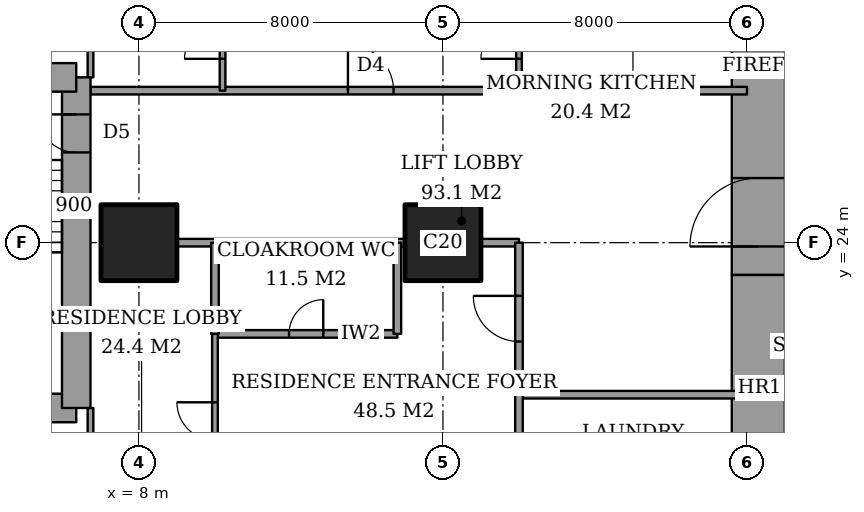
"""IFC4 building model, lengths in metres.
Left out: names, types, materials, properties, quantities, classifications, styles, units other than length and angle.
Written with IfcOpenShell. Run it as: python <this file> out.ifc"""

import sys

from ifc_helpers import new_model, si_unit, direction, frame, frame_2d, origin, origin_2d, place, context, subcontext, project, spatial, rectangle, extrude, element, fill, save


model = new_model("IFC4")
c1 = context("Model", 3, precision=1e-05, world=origin(), true_north=direction((0.0, 1.0)))
c2 = subcontext(c1, "Body", "Model", "MODEL_VIEW")
j1 = project(units=[si_unit("LENGTHUNIT", "METRE"), si_unit("PLANEANGLEUNIT", "RADIAN")], contexts=[c1])
p1 = place(None, origin())
s1 = spatial("IfcSite", under=j1, at=p1, CompositionType="ELEMENT")
p2 = place(p1, origin())
s2 = spatial("IfcBuilding", under=s1, at=p2, CompositionType="ELEMENT")
p3 = place(p2, frame((0.0, 0.0, 121.4)))
s3 = spatial("IfcBuildingStorey", under=s2, at=p3, CompositionType="ELEMENT", Elevation=121.4)
for number, where, z_axis, x_axis in (
    (1, (8.0, 24.0, 0.0), (0.0, 0.0, 1.0), (1.0, 0.0, 0.0)),
    (2, (16.0, 24.0, 0.0), (0.0, 0.0, 1.0), (1.0, 0.0, 0.0)),
):
    element("IfcColumn", number, at=place(p3, frame(where, z_axis=z_axis, x_axis=x_axis)), inside=s3, PredefinedType="COLUMN", context=c2, shape_type="SweptSolid", body=[
        extrude(rectangle(XDim=2.0, YDim=2.0, at=origin_2d()), origin(), (0.0, 0.0, 1.0), 3.6),
    ])
p4 = place(p3, frame((24.3, 13.0, 0.0), z_axis=(0.0, 0.0, 1.0), x_axis=(0.0, 1.0, 0.0)))
e3 = element("IfcWall", 3, at=p4, inside=s3, PredefinedType="SHEAR", context=c2, shape_type="SweptSolid", body=[
    extrude(rectangle(XDim=10.15, YDim=1.4, at=frame_2d((5.075, 0.0))), origin(), (0.0, 0.0, 1.0), 3.6),
])
p5 = place(p3, frame((24.3, 23.15, 0.0), z_axis=(0.0, 0.0, 1.0), x_axis=(0.0, 1.0, 0.0)))
e4 = element("IfcWall", 4, at=p5, inside=s3, PredefinedType="SHEAR", context=c2, shape_type="SweptSolid", body=[
    extrude(rectangle(XDim=11.85, YDim=1.4, at=frame_2d((5.925, 0.0))), origin(), (0.0, 0.0, 1.0), 3.6),
])
p6 = place(p5, frame((0.75, 0.0, 0.0)))
e5 = element("IfcOpeningElement", 5, at=p6, cuts=e4, PredefinedType="OPENING", context=c2, shape_type="SweptSolid", body=[
    extrude(rectangle(XDim=1.8, YDim=2.4, at=frame_2d((0.9, 1.2))), frame((0.0, 0.71, 0.0), z_axis=(0.0, -1.0, 0.0), x_axis=(1.0, 0.0, 0.0)), (0.0, 0.0, 1.0), 1.42),
])
p7 = place(p3, frame((1.9, 19.65, 0.0), z_axis=(0.0, 0.0, 1.0), x_axis=(1.0, 0.0, 0.0)))
e6 = element("IfcWall", 6, at=p7, inside=s3, PredefinedType="SHEAR", context=c2, shape_type="SweptSolid", body=[
    extrude(rectangle(XDim=4.45, YDim=0.75, at=frame_2d((2.225, 0.0))), origin(), (0.0, 0.0, 1.0), 3.6),
])
p8 = place(p3, frame((6.35, 19.65, 0.0), z_axis=(0.0, 0.0, 1.0), x_axis=(0.0, 1.0, 0.0)))
e7 = element("IfcWall", 7, at=p8, inside=s3, PredefinedType="SHEAR", context=c2, shape_type="SweptSolid", body=[
    extrude(rectangle(XDim=8.7, YDim=0.75, at=frame_2d((4.35, 0.0))), origin(), (0.0, 0.0, 1.0), 3.6),
])
p9 = place(p8, frame((6.725, 0.0, 0.0)))
e8 = element("IfcOpeningElement", 8, at=p9, cuts=e7, PredefinedType="OPENING", context=c2, shape_type="SweptSolid", body=[
    extrude(rectangle(XDim=1.0, YDim=2.1, at=frame_2d((0.5, 1.05))), frame((0.0, 0.385, 0.0), z_axis=(0.0, -1.0, 0.0), x_axis=(1.0, 0.0, 0.0)), (0.0, 0.0, 1.0), 0.77),
])
p10 = place(p3, frame((6.35, 28.35, 0.0), z_axis=(0.0, 0.0, 1.0), x_axis=(-1.0, 0.0, 0.0)))
e9 = element("IfcWall", 9, at=p10, inside=s3, PredefinedType="SHEAR", context=c2, shape_type="SweptSolid", body=[
    extrude(rectangle(XDim=4.45, YDim=0.75, at=frame_2d((2.225, 0.0))), origin(), (0.0, 0.0, 1.0), 3.6),
])
p11 = place(p3, frame((18.0, 20.0, 0.0), z_axis=(0.0, 0.0, 1.0), x_axis=(1.0, 0.0, 0.0)))
e10 = element("IfcWall", 10, at=p11, inside=s3, PredefinedType="PARTITIONING", context=c2, shape_type="SweptSolid", body=[
    extrude(rectangle(XDim=6.0, YDim=0.2, at=frame_2d((3.0, 0.0))), origin(), (0.0, 0.0, 1.0), 3.35),
])
p12 = place(p3, frame((10.0, 21.6, 0.0), z_axis=(0.0, 0.0, 1.0), x_axis=(1.0, 0.0, 0.0)))
e11 = element("IfcWall", 11, at=p12, inside=s3, PredefinedType="PARTITIONING", context=c2, shape_type="SweptSolid", body=[
    extrude(rectangle(XDim=4.8, YDim=0.2, at=frame_2d((2.4, 0.0))), origin(), (0.0, 0.0, 1.0), 3.35),
])
p13 = place(p12, frame((1.95, 0.0, 0.0)))
e12 = element("IfcOpeningElement", 12, at=p13, cuts=e11, PredefinedType="OPENING", context=c2, shape_type="SweptSolid", body=[
    extrude(rectangle(XDim=0.9, YDim=2.1, at=frame_2d((0.45, 1.05))), frame((0.0, 0.11, 0.0), z_axis=(0.0, -1.0, 0.0), x_axis=(1.0, 0.0, 0.0)), (0.0, 0.0, 1.0), 0.22),
])
p14 = place(p3, frame((9.0, 24.0, 0.0), z_axis=(0.0, 0.0, 1.0), x_axis=(1.0, 0.0, 0.0)))
e13 = element("IfcWall", 13, at=p14, inside=s3, PredefinedType="PARTITIONING", context=c2, shape_type="SweptSolid", body=[
    extrude(rectangle(XDim=6.0, YDim=0.2, at=frame_2d((3.0, 0.0))), origin(), (0.0, 0.0, 1.0), 3.35),
])
p15 = place(p3, frame((17.0, 24.0, 0.0), z_axis=(0.0, 0.0, 1.0), x_axis=(1.0, 0.0, 0.0)))
e14 = element("IfcWall", 14, at=p15, inside=s3, PredefinedType="PARTITIONING", context=c2, shape_type="SweptSolid", body=[
    extrude(rectangle(XDim=1.0, YDim=0.2, at=frame_2d((0.5, 0.0))), origin(), (0.0, 0.0, 1.0), 3.35),
])
p16 = place(p3, frame((6.725, 28.0, 0.0), z_axis=(0.0, 0.0, 1.0), x_axis=(1.0, 0.0, 0.0)))
e15 = element("IfcWall", 15, at=p16, inside=s3, PredefinedType="PARTITIONING", context=c2, shape_type="SweptSolid", body=[
    extrude(rectangle(XDim=17.275, YDim=0.2, at=frame_2d((8.637, 0.0))), origin(), (0.0, 0.0, 1.0), 3.35),
])
p17 = place(p16, frame((6.775, 0.0, 0.0)))
e16 = element("IfcOpeningElement", 16, at=p17, cuts=e15, PredefinedType="OPENING", context=c2, shape_type="SweptSolid", body=[
    extrude(rectangle(XDim=1.2, YDim=2.4, at=frame_2d((0.6, 1.2))), frame((0.0, 0.11, 0.0), z_axis=(0.0, -1.0, 0.0), x_axis=(1.0, 0.0, 0.0)), (0.0, 0.0, 1.0), 0.22),
])
p18 = place(p3, frame((6.725, 17.2, 0.0), z_axis=(0.0, 0.0, 1.0), x_axis=(0.0, 1.0, 0.0)))
e17 = element("IfcWall", 17, at=p18, inside=s3, PredefinedType="PARTITIONING", context=c2, shape_type="SweptSolid", body=[
    extrude(rectangle(XDim=2.45, YDim=0.15, at=frame_2d((1.225, 0.0))), origin(), (0.0, 0.0, 1.0), 3.35),
])
p19 = place(p18, frame((0.538, 0.0, 0.0)))
e18 = element("IfcOpeningElement", 18, at=p19, cuts=e17, PredefinedType="OPENING", context=c2, shape_type="SweptSolid", body=[
    extrude(rectangle(XDim=1.0, YDim=2.1, at=frame_2d((0.5, 1.05))), frame((0.0, 0.085, 0.0), z_axis=(0.0, -1.0, 0.0), x_axis=(1.0, 0.0, 0.0)), (0.0, 0.0, 1.0), 0.17),
])
p20 = place(p3, frame((6.725, 28.35, 0.0), z_axis=(0.0, 0.0, 1.0), x_axis=(0.0, 1.0, 0.0)))
e19 = element("IfcWall", 19, at=p20, inside=s3, PredefinedType="PARTITIONING", context=c2, shape_type="SweptSolid", body=[
    extrude(rectangle(XDim=2.45, YDim=0.15, at=frame_2d((1.225, 0.0))), origin(), (0.0, 0.0, 1.0), 3.35),
])
p21 = place(p20, frame((0.962, 0.0, 0.0)))
e20 = element("IfcOpeningElement", 20, at=p21, cuts=e19, PredefinedType="OPENING", context=c2, shape_type="SweptSolid", body=[
    extrude(rectangle(XDim=0.9, YDim=2.1, at=frame_2d((0.45, 1.05))), frame((0.0, 0.085, 0.0), z_axis=(0.0, -1.0, 0.0), x_axis=(1.0, 0.0, 0.0)), (0.0, 0.0, 1.0), 0.17),
])
p22 = place(p3, frame((10.0, 21.6, 0.0), z_axis=(0.0, 0.0, 1.0), x_axis=(0.0, 1.0, 0.0)))
e21 = element("IfcWall", 21, at=p22, inside=s3, PredefinedType="PARTITIONING", context=c2, shape_type="SweptSolid", body=[
    extrude(rectangle(XDim=2.4, YDim=0.2, at=frame_2d((1.2, 0.0))), origin(), (0.0, 0.0, 1.0), 3.35),
])
p23 = place(p3, frame((10.0, 10.6, 0.0), z_axis=(0.0, 0.0, 1.0), x_axis=(0.0, 1.0, 0.0)))
e22 = element("IfcWall", 22, at=p23, inside=s3, PredefinedType="PARTITIONING", context=c2, shape_type="SweptSolid", body=[
    extrude(rectangle(XDim=11.0, YDim=0.15, at=frame_2d((5.5, 0.0))), origin(), (0.0, 0.0, 1.0), 3.35),
])
p24 = place(p23, frame((8.2, 0.0, 0.0)))
e23 = element("IfcOpeningElement", 23, at=p24, cuts=e22, PredefinedType="OPENING", context=c2, shape_type="SweptSolid", body=[
    extrude(rectangle(XDim=1.0, YDim=2.1, at=frame_2d((0.5, 1.05))), frame((0.0, 0.085, 0.0), z_axis=(0.0, -1.0, 0.0), x_axis=(1.0, 0.0, 0.0)), (0.0, 0.0, 1.0), 0.17),
])
p25 = place(p3, frame((10.2, 28.0, 0.0), z_axis=(0.0, 0.0, 1.0), x_axis=(0.0, 1.0, 0.0)))
e24 = element("IfcWall", 24, at=p25, inside=s3, PredefinedType="PARTITIONING", context=c2, shape_type="SweptSolid", body=[
    extrude(rectangle(XDim=9.4, YDim=0.15, at=frame_2d((4.7, 0.0))), origin(), (0.0, 0.0, 1.0), 3.35),
])
p26 = place(p25, frame((0.837, 0.0, 0.0)))
e25 = element("IfcOpeningElement", 25, at=p26, cuts=e24, PredefinedType="OPENING", context=c2, shape_type="SweptSolid", body=[
    extrude(rectangle(XDim=1.0, YDim=2.1, at=frame_2d((0.5, 1.05))), frame((0.0, 0.085, 0.0), z_axis=(0.0, -1.0, 0.0), x_axis=(1.0, 0.0, 0.0)), (0.0, 0.0, 1.0), 0.17),
])
p27 = place(p3, frame((14.8, 21.6, 0.0), z_axis=(0.0, 0.0, 1.0), x_axis=(0.0, 1.0, 0.0)))
e26 = element("IfcWall", 26, at=p27, inside=s3, PredefinedType="PARTITIONING", context=c2, shape_type="SweptSolid", body=[
    extrude(rectangle(XDim=2.4, YDim=0.2, at=frame_2d((1.2, 0.0))), origin(), (0.0, 0.0, 1.0), 3.35),
])
p28 = place(p3, frame((18.0, 17.0, 0.0), z_axis=(0.0, 0.0, 1.0), x_axis=(0.0, 1.0, 0.0)))
e27 = element("IfcWall", 27, at=p28, inside=s3, PredefinedType="PARTITIONING", context=c2, shape_type="SweptSolid", body=[
    extrude(rectangle(XDim=7.0, YDim=0.2, at=frame_2d((3.5, 0.0))), origin(), (0.0, 0.0, 1.0), 3.35),
])
p29 = place(p28, frame((4.4, 0.0, 0.0)))
e28 = element("IfcOpeningElement", 28, at=p29, cuts=e27, PredefinedType="OPENING", context=c2, shape_type="SweptSolid", body=[
    extrude(rectangle(XDim=1.2, YDim=2.4, at=frame_2d((0.6, 1.2))), frame((0.0, 0.11, 0.0), z_axis=(0.0, -1.0, 0.0), x_axis=(1.0, 0.0, 0.0)), (0.0, 0.0, 1.0), 0.22),
])
p30 = place(p28, frame((1.05, 0.0, 0.0)))
e29 = element("IfcOpeningElement", 29, at=p30, cuts=e27, PredefinedType="OPENING", context=c2, shape_type="SweptSolid", body=[
    extrude(rectangle(XDim=0.9, YDim=2.1, at=frame_2d((0.45, 1.05))), frame((0.0, 0.11, 0.0), z_axis=(0.0, -1.0, 0.0), x_axis=(1.0, 0.0, 0.0)), (0.0, 0.0, 1.0), 0.22),
])
p31 = place(p3, frame((18.0, 28.0, 0.0), z_axis=(0.0, 0.0, 1.0), x_axis=(0.0, 1.0, 0.0)))
e30 = element("IfcWall", 30, at=p31, inside=s3, PredefinedType="PARTITIONING", context=c2, shape_type="SweptSolid", body=[
    extrude(rectangle(XDim=9.4, YDim=0.15, at=frame_2d((4.7, 0.0))), origin(), (0.0, 0.0, 1.0), 3.35),
])
p32 = place(p31, frame((0.837, 0.0, 0.0)))
e31 = element("IfcOpeningElement", 31, at=p32, cuts=e30, PredefinedType="OPENING", context=c2, shape_type="SweptSolid", body=[
    extrude(rectangle(XDim=1.0, YDim=2.1, at=frame_2d((0.5, 1.05))), frame((0.0, 0.085, 0.0), z_axis=(0.0, -1.0, 0.0), x_axis=(1.0, 0.0, 0.0)), (0.0, 0.0, 1.0), 0.17),
])
p33 = place(p24, origin())
e32 = element("IfcDoor", 32, at=p33, inside=s3, OperationType="SINGLE_SWING_LEFT", PredefinedType="DOOR", context=c2, shape_type="SweptSolid", body=[
    extrude(rectangle(XDim=1.0, YDim=2.1, at=frame_2d((0.5, 1.05))), frame((0.0, 0.025, 0.0), z_axis=(0.0, -1.0, 0.0), x_axis=(1.0, 0.0, 0.0)), (0.0, 0.0, 1.0), 0.05),
])
fill(e23, e32)
p34 = place(p13, origin())
e33 = element("IfcDoor", 33, at=p34, inside=s3, OperationType="SINGLE_SWING_LEFT", PredefinedType="DOOR", context=c2, shape_type="SweptSolid", body=[
    extrude(rectangle(XDim=0.9, YDim=2.1, at=frame_2d((0.45, 1.05))), frame((0.0, 0.025, 0.0), z_axis=(0.0, -1.0, 0.0), x_axis=(1.0, 0.0, 0.0)), (0.0, 0.0, 1.0), 0.05),
])
fill(e12, e33)
p35 = place(p29, origin())
e34 = element("IfcDoor", 34, at=p35, inside=s3, OperationType="SINGLE_SWING_LEFT", PredefinedType="DOOR", context=c2, shape_type="SweptSolid", body=[
    extrude(rectangle(XDim=1.2, YDim=2.4, at=frame_2d((0.6, 1.2))), frame((0.0, 0.025, 0.0), z_axis=(0.0, -1.0, 0.0), x_axis=(1.0, 0.0, 0.0)), (0.0, 0.0, 1.0), 0.05),
])
fill(e28, e34)
p36 = place(p26, origin())
e35 = element("IfcDoor", 35, at=p36, inside=s3, OperationType="SINGLE_SWING_RIGHT", PredefinedType="DOOR", context=c2, shape_type="SweptSolid", body=[
    extrude(rectangle(XDim=1.0, YDim=2.1, at=frame_2d((0.5, 1.05))), frame((0.0, 0.025, 0.0), z_axis=(0.0, -1.0, 0.0), x_axis=(1.0, 0.0, 0.0)), (0.0, 0.0, 1.0), 0.05),
])
fill(e25, e35)
p37 = place(p17, origin())
e36 = element("IfcDoor", 36, at=p37, inside=s3, OperationType="SINGLE_SWING_RIGHT", PredefinedType="DOOR", context=c2, shape_type="SweptSolid", body=[
    extrude(rectangle(XDim=1.2, YDim=2.4, at=frame_2d((0.6, 1.2))), frame((0.0, 0.025, 0.0), z_axis=(0.0, -1.0, 0.0), x_axis=(1.0, 0.0, 0.0)), (0.0, 0.0, 1.0), 0.05),
])
fill(e16, e36)
p38 = place(p32, origin())
e37 = element("IfcDoor", 37, at=p38, inside=s3, OperationType="SINGLE_SWING_RIGHT", PredefinedType="DOOR", context=c2, shape_type="SweptSolid", body=[
    extrude(rectangle(XDim=1.0, YDim=2.1, at=frame_2d((0.5, 1.05))), frame((0.0, 0.025, 0.0), z_axis=(0.0, -1.0, 0.0), x_axis=(1.0, 0.0, 0.0)), (0.0, 0.0, 1.0), 0.05),
])
fill(e31, e37)
p39 = place(p6, origin())
e38 = element("IfcDoor", 38, at=p39, inside=s3, OperationType="DOUBLE_DOOR_DOUBLE_SWING", PredefinedType="DOOR", context=c2, shape_type="SweptSolid", body=[
    extrude(rectangle(XDim=1.8, YDim=2.4, at=frame_2d((0.9, 1.2))), frame((0.0, 0.025, 0.0), z_axis=(0.0, -1.0, 0.0), x_axis=(1.0, 0.0, 0.0)), (0.0, 0.0, 1.0), 0.05),
])
fill(e5, e38)
p40 = place(p9, origin())
e39 = element("IfcDoor", 39, at=p40, inside=s3, OperationType="SINGLE_SWING_LEFT", PredefinedType="DOOR", context=c2, shape_type="SweptSolid", body=[
    extrude(rectangle(XDim=1.0, YDim=2.1, at=frame_2d((0.5, 1.05))), frame((0.0, 0.025, 0.0), z_axis=(0.0, -1.0, 0.0), x_axis=(1.0, 0.0, 0.0)), (0.0, 0.0, 1.0), 0.05),
])
fill(e8, e39)
save(model, sys.argv[1])
